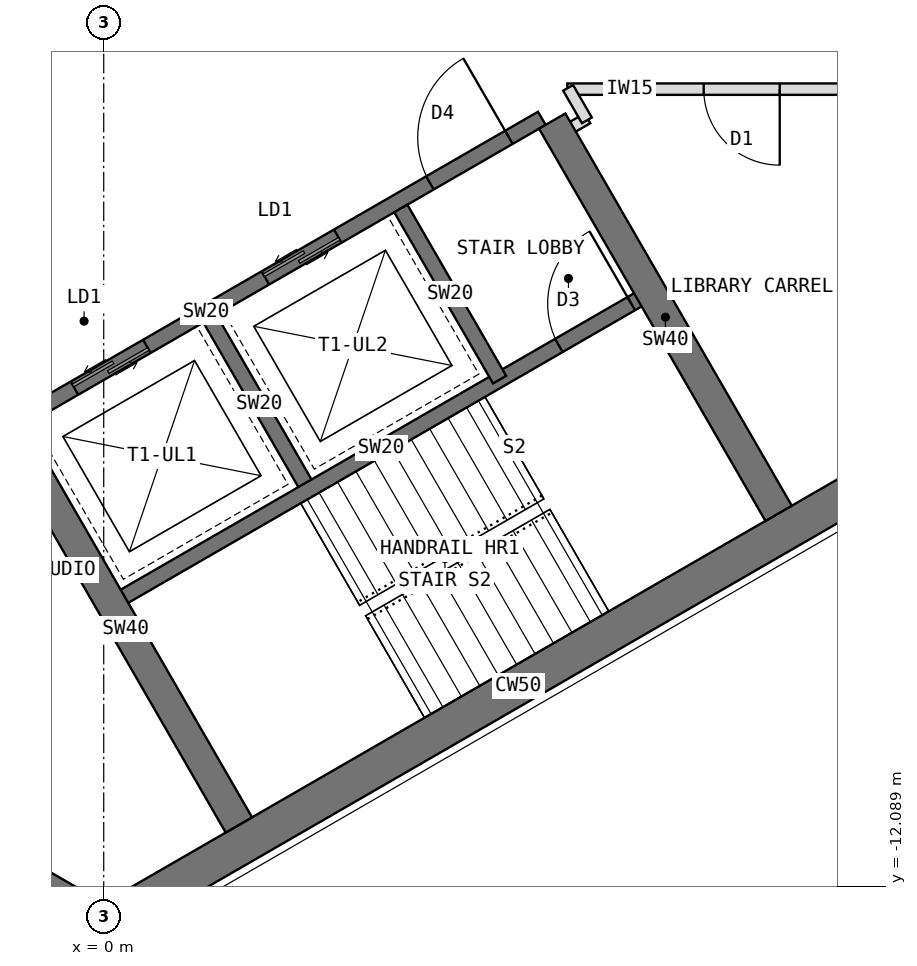
"""IFC4 building model, lengths in metres.
Left out: names, types, materials, properties, quantities, classifications, styles, units other than length and angle.
Written with IfcOpenShell. Run it as: python <this file> out.ifc"""

import sys

from ifc_helpers import new_model, si_unit, direction, frame, frame_2d, origin, place, context, subcontext, project, spatial, rectangle, extrude, element, fill, save


model = new_model("IFC4")
c1 = context("Model", 3, precision=1e-05, world=origin(), true_north=direction((0.0, 1.0)))
c2 = subcontext(c1, "Body", "Model", "MODEL_VIEW")
j1 = project(units=[si_unit("LENGTHUNIT", "METRE"), si_unit("PLANEANGLEUNIT", "RADIAN")], contexts=[c1])
p1 = place(None, origin())
s1 = spatial("IfcSite", under=j1, at=p1, CompositionType="ELEMENT")
p2 = place(p1, origin())
s2 = spatial("IfcBuilding", under=s1, at=p2, CompositionType="ELEMENT")
p3 = place(p2, frame((0.0, 0.0, 174.5)))
s3 = spatial("IfcBuildingStorey", under=s2, at=p3, CompositionType="ELEMENT", Elevation=174.5)
p4 = place(p3, frame((-3.939, -10.322, 0.0), z_axis=(0.0, 0.0, 1.0), x_axis=(0.866011268655, -0.500024481964, 0.0)))
e1 = element("IfcWall", 1, at=p4, inside=s3, PredefinedType="SHEAR", context=c2, shape_type="SweptSolid", body=[
    extrude(rectangle(XDim=4.548, YDim=0.5, at=frame_2d((2.274, 0.0))), origin(), (0.0, 0.0, 1.0), 4.0),
])
p5 = place(p3, frame((0.0, -12.596, 0.0), z_axis=(0.0, 0.0, 1.0), x_axis=(0.866021940709, 0.500005998175, 0.0)))
e2 = element("IfcWall", 2, at=p5, inside=s3, PredefinedType="SHEAR", context=c2, shape_type="SweptSolid", body=[
    extrude(rectangle(XDim=12.596, YDim=0.5, at=frame_2d((6.298, 0.0))), origin(), (0.0, 0.0, 1.0), 4.0),
])
p6 = place(p3, frame((-1.164, -5.984, 0.0), z_axis=(0.0, 0.0, 1.0), x_axis=(0.866026010844, 0.49999894854, 0.0)))
e3 = element("IfcWall", 3, at=p6, inside=s3, PredefinedType="SHEAR", context=c2, shape_type="SweptSolid", body=[
    extrude(rectangle(XDim=8.0, YDim=0.2, at=frame_2d((4.0, 0.0))), origin(), (0.0, 0.0, 1.0), 4.0),
])
p7 = place(p6, frame((6.3, 0.0, 0.0)))
e4 = element("IfcOpeningElement", 4, at=p7, cuts=e3, PredefinedType="OPENING", context=c2, shape_type="SweptSolid", body=[
    extrude(rectangle(XDim=1.2, YDim=2.1, at=frame_2d((0.6, 1.05))), frame((0.0, 0.11, 0.0), z_axis=(0.0, -1.0, 0.0), x_axis=(1.0, 0.0, 0.0)), (0.0, 0.0, 1.0), 0.22),
])
p8 = place(p6, frame((0.9, 0.0, 0.0)))
e5 = element("IfcOpeningElement", 5, at=p8, cuts=e3, PredefinedType="OPENING", context=c2, shape_type="SweptSolid", body=[
    extrude(rectangle(XDim=1.1, YDim=2.2, at=frame_2d((0.55, 1.1))), frame((0.0, 0.11, 0.0), z_axis=(0.0, -1.0, 0.0), x_axis=(1.0, 0.0, 0.0)), (0.0, 0.0, 1.0), 0.22),
])
p9 = place(p6, frame((3.8, 0.0, 0.0)))
e6 = element("IfcOpeningElement", 6, at=p9, cuts=e3, PredefinedType="OPENING", context=c2, shape_type="SweptSolid", body=[
    extrude(rectangle(XDim=1.1, YDim=2.2, at=frame_2d((0.55, 1.1))), frame((0.0, 0.11, 0.0), z_axis=(0.0, -1.0, 0.0), x_axis=(1.0, 0.0, 0.0)), (0.0, 0.0, 1.0), 0.22),
])
p10 = place(p3, frame((1.397, -4.62, 0.0), z_axis=(0.0, 0.0, 1.0), x_axis=(0.499936506574, -0.866062058628, 0.0)))
e7 = element("IfcWall", 7, at=p10, inside=s3, PredefinedType="SHEAR", context=c2, shape_type="SweptSolid", body=[
    extrude(rectangle(XDim=2.6, YDim=0.2, at=frame_2d((1.3, 0.0))), origin(), (0.0, 0.0, 1.0), 4.0),
])
p11 = place(p3, frame((3.909, -3.17, 0.0), z_axis=(0.0, 0.0, 1.0), x_axis=(0.49997716683, -0.86603858612, 0.0)))
e8 = element("IfcWall", 8, at=p11, inside=s3, PredefinedType="SHEAR", context=c2, shape_type="SweptSolid", body=[
    extrude(rectangle(XDim=2.6, YDim=0.2, at=frame_2d((1.3, 0.0))), origin(), (0.0, 0.0, 1.0), 4.0),
])
p12 = place(p3, frame((0.186, -8.322, 0.0), z_axis=(0.0, 0.0, 1.0), x_axis=(0.866026010844, 0.49999894854, 0.0)))
e9 = element("IfcWall", 9, at=p12, inside=s3, PredefinedType="SHEAR", context=c2, shape_type="SweptSolid", body=[
    extrude(rectangle(XDim=8.0, YDim=0.2, at=frame_2d((4.0, 0.0))), origin(), (0.0, 0.0, 1.0), 4.0),
])
p13 = place(p12, frame((6.7, 0.0, 0.0)))
e10 = element("IfcOpeningElement", 10, at=p13, cuts=e9, PredefinedType="OPENING", context=c2, shape_type="SweptSolid", body=[
    extrude(rectangle(XDim=1.1, YDim=2.1, at=frame_2d((0.55, 1.05))), frame((0.0, 0.11, 0.0), z_axis=(0.0, -1.0, 0.0), x_axis=(1.0, 0.0, 0.0)), (0.0, 0.0, 1.0), 0.22),
])
p14 = place(p3, frame((5.901, -2.02, 0.0), z_axis=(0.0, 0.0, 1.0), x_axis=(0.500003832394, -0.86602319114, 0.0)))
e11 = element("IfcWall", 11, at=p14, inside=s3, PredefinedType="SHEAR", context=c2, shape_type="SweptSolid", body=[
    extrude(rectangle(XDim=5.958, YDim=0.4, at=frame_2d((2.979, 0.0))), origin(), (0.0, 0.0, 1.0), 4.0),
])
p15 = place(p3, frame((-1.201, -6.12, 0.0), z_axis=(0.0, 0.0, 1.0), x_axis=(0.500021575205, -0.866012946976, 0.0)))
e12 = element("IfcWall", 12, at=p15, inside=s3, PredefinedType="SHEAR", context=c2, shape_type="SweptSolid", body=[
    extrude(rectangle(XDim=5.958, YDim=0.4, at=frame_2d((2.979, 0.0))), origin(), (0.0, 0.0, 1.0), 4.0),
])
p16 = place(p3, frame((6.365, -1.983, 0.0), z_axis=(0.0, 0.0, 1.0), x_axis=(-0.865892400268, -0.500230298122, 0.0)))
e13 = element("IfcWall", 13, at=p16, inside=s3, PredefinedType="PARTITIONING", context=c2, shape_type="SweptSolid", body=[
    extrude(rectangle(XDim=0.43, YDim=0.15, at=frame_2d((0.215, 0.0))), origin(), (0.0, 0.0, 1.0), 3.8),
])
p17 = place(p3, frame((10.668, -1.6, 0.0), z_axis=(0.0, 0.0, 1.0), x_axis=(-1.0, 0.0, 0.0)))
e14 = element("IfcWall", 14, at=p17, inside=s3, PredefinedType="PARTITIONING", context=c2, shape_type="SweptSolid", body=[
    extrude(rectangle(XDim=4.568, YDim=0.15, at=frame_2d((2.284, 0.0))), origin(), (0.0, 0.0, 1.0), 3.8),
])
p18 = place(p17, frame((1.774, 0.0, 0.0)))
e15 = element("IfcOpeningElement", 15, at=p18, cuts=e14, PredefinedType="OPENING", context=c2, shape_type="SweptSolid", body=[
    extrude(rectangle(XDim=1.0, YDim=2.1, at=frame_2d((0.5, 1.05))), frame((0.0, 0.085, 0.0), z_axis=(0.0, -1.0, 0.0), x_axis=(1.0, 0.0, 0.0)), (0.0, 0.0, 1.0), 0.17),
])
p19 = place(p3, frame((6.11, -1.583, 0.0), z_axis=(0.0, 0.0, 1.0), x_axis=(0.50033519877, -0.865831790172, 0.0)))
e16 = element("IfcWall", 16, at=p19, inside=s3, PredefinedType="PARTITIONING", context=c2, shape_type="SweptSolid", body=[
    extrude(rectangle(XDim=0.494, YDim=0.15, at=frame_2d((0.247, 0.0))), origin(), (0.0, 0.0, 1.0), 3.8),
])
p20 = place(p7, origin())
e17 = element("IfcDoor", 17, at=p20, inside=s3, OperationType="SINGLE_SWING_RIGHT", PredefinedType="DOOR", context=c2, shape_type="SweptSolid", body=[
    extrude(rectangle(XDim=1.2, YDim=2.1, at=frame_2d((0.6, 1.05))), frame((0.0, 0.025, 0.0), z_axis=(0.0, -1.0, 0.0), x_axis=(1.0, 0.0, 0.0)), (0.0, 0.0, 1.0), 0.05),
])
fill(e4, e17)
p21 = place(p8, origin())
e18 = element("IfcDoor", 18, at=p21, inside=s3, OperationType="DOUBLE_DOOR_SLIDING", PredefinedType="DOOR", context=c2, shape_type="SweptSolid", body=[
    extrude(rectangle(XDim=1.1, YDim=2.2, at=frame_2d((0.55, 1.1))), frame((0.0, 0.025, 0.0), z_axis=(0.0, -1.0, 0.0), x_axis=(1.0, 0.0, 0.0)), (0.0, 0.0, 1.0), 0.05),
])
fill(e5, e18)
p22 = place(p9, origin())
e19 = element("IfcDoor", 19, at=p22, inside=s3, OperationType="DOUBLE_DOOR_SLIDING", PredefinedType="DOOR", context=c2, shape_type="SweptSolid", body=[
    extrude(rectangle(XDim=1.1, YDim=2.2, at=frame_2d((0.55, 1.1))), frame((0.0, 0.025, 0.0), z_axis=(0.0, -1.0, 0.0), x_axis=(1.0, 0.0, 0.0)), (0.0, 0.0, 1.0), 0.05),
])
fill(e6, e19)
p23 = place(p13, origin())
e20 = element("IfcDoor", 20, at=p23, inside=s3, OperationType="SINGLE_SWING_RIGHT", PredefinedType="DOOR", context=c2, shape_type="SweptSolid", body=[
    extrude(rectangle(XDim=1.1, YDim=2.1, at=frame_2d((0.55, 1.05))), frame((0.0, 0.025, 0.0), z_axis=(0.0, -1.0, 0.0), x_axis=(1.0, 0.0, 0.0)), (0.0, 0.0, 1.0), 0.05),
])
fill(e10, e20)
p24 = place(p18, origin())
e21 = element("IfcDoor", 21, at=p24, inside=s3, OperationType="SINGLE_SWING_LEFT", PredefinedType="DOOR", context=c2, shape_type="SweptSolid", body=[
    extrude(rectangle(XDim=1.0, YDim=2.1, at=frame_2d((0.5, 1.05))), frame((0.0, 0.025, 0.0), z_axis=(0.0, -1.0, 0.0), x_axis=(1.0, 0.0, 0.0)), (0.0, 0.0, 1.0), 0.05),
])
fill(e15, e21)
save(model, sys.argv[1])
